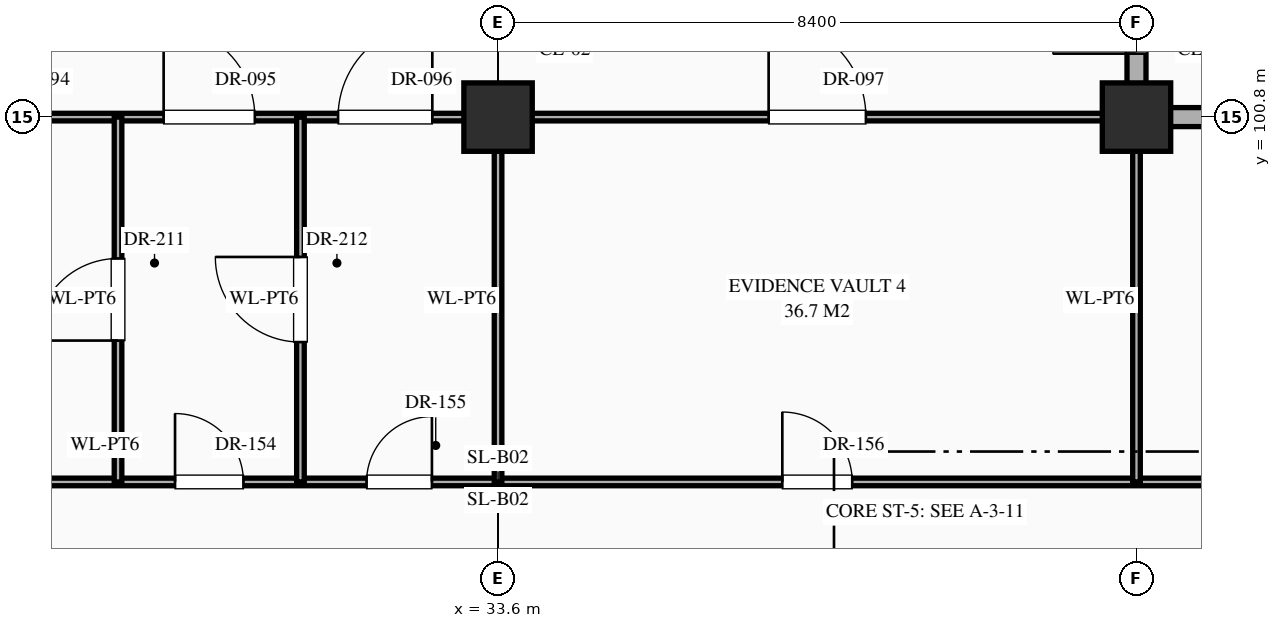
"""IFC4 building model, lengths in metres.
Left out: names, types, materials, properties, quantities, classifications, styles, units other than length and angle.
Written with IfcOpenShell. Run it as: python <this file> out.ifc"""

import sys

from ifc_helpers import new_model, si_unit, direction, frame, frame_2d, origin, origin_2d, place, context, subcontext, project, spatial, rectangle, extrude, element, fill, save


model = new_model("IFC4")
c1 = context("Model", 3, precision=1e-05, world=origin(), true_north=direction((0.0, 1.0)))
c2 = subcontext(c1, "Body", "Model", "MODEL_VIEW")
j1 = project(units=[si_unit("LENGTHUNIT", "METRE"), si_unit("PLANEANGLEUNIT", "RADIAN")], contexts=[c1])
p1 = place(None, origin())
s1 = spatial("IfcSite", under=j1, at=p1, CompositionType="ELEMENT")
p2 = place(p1, origin())
s2 = spatial("IfcBuilding", under=s1, at=p2, CompositionType="ELEMENT")
p3 = place(p2, frame((0.0, 0.0, -10.2)))
s3 = spatial("IfcBuildingStorey", under=s2, at=p3, CompositionType="ELEMENT", Elevation=-10.2)
for number, where, z_axis, x_axis in (
    (1, (33.6, 100.8, 0.0), (0.0, 0.0, 1.0), (1.0, 0.0, 0.0)),
    (2, (42.0, 100.8, 0.0), (0.0, 0.0, 1.0), (1.0, 0.0, 0.0)),
):
    element("IfcColumn", number, at=place(p3, frame(where, z_axis=z_axis, x_axis=x_axis)), inside=s3, PredefinedType="COLUMN", context=c2, shape_type="SweptSolid", body=[
        extrude(rectangle(XDim=0.9, YDim=0.9, at=origin_2d()), origin(), (0.0, 0.0, 1.0), 4.8),
    ])
p4 = place(p3, frame((0.04, 96.0, 0.0), z_axis=(0.0, 0.0, 1.0), x_axis=(1.0, 0.0, 0.0)))
e3 = element("IfcWall", 3, at=p4, inside=s3, PredefinedType="STANDARD", context=c2, shape_type="SweptSolid", body=[
    extrude(rectangle(XDim=151.16, YDim=0.1, at=frame_2d((75.58, 0.0))), origin(), (0.0, 0.0, 1.0), 4.48),
])
p5 = place(p4, frame((1.04, 0.0, 0.0)))
e4 = element("IfcOpeningElement", 4, at=p5, cuts=e3, PredefinedType="OPENING", context=c2, shape_type="SweptSolid", body=[
    extrude(rectangle(XDim=1.28, YDim=2.35, at=frame_2d((0.64, 1.175))), frame((0.0, 0.062, 0.0), z_axis=(0.0, -1.0, 0.0), x_axis=(1.0, 0.0, 0.0)), (0.0, 0.0, 1.0), 0.124),
])
p6 = place(p4, frame((4.09, 0.0, 0.0)))
e5 = element("IfcOpeningElement", 5, at=p6, cuts=e3, PredefinedType="OPENING", context=c2, shape_type="SweptSolid", body=[
    extrude(rectangle(XDim=0.94, YDim=2.3, at=frame_2d((0.47, 1.15))), frame((0.0, 0.062, 0.0), z_axis=(0.0, -1.0, 0.0), x_axis=(1.0, 0.0, 0.0)), (0.0, 0.0, 1.0), 0.124),
])
p7 = place(p4, frame((6.57, 0.0, 0.0)))
e6 = element("IfcOpeningElement", 6, at=p7, cuts=e3, PredefinedType="OPENING", context=c2, shape_type="SweptSolid", body=[
    extrude(rectangle(XDim=0.98, YDim=2.35, at=frame_2d((0.49, 1.175))), frame((0.0, 0.062, 0.0), z_axis=(0.0, -1.0, 0.0), x_axis=(1.0, 0.0, 0.0)), (0.0, 0.0, 1.0), 0.124),
])
p8 = place(p4, frame((12.05, 0.0, 0.0)))
e7 = element("IfcOpeningElement", 7, at=p8, cuts=e3, PredefinedType="OPENING", context=c2, shape_type="SweptSolid", body=[
    extrude(rectangle(XDim=1.02, YDim=2.4, at=frame_2d((0.51, 1.2))), frame((0.0, 0.062, 0.0), z_axis=(0.0, -1.0, 0.0), x_axis=(1.0, 0.0, 0.0)), (0.0, 0.0, 1.0), 0.124),
])
p9 = place(p4, frame((20.43, 0.0, 0.0)))
e8 = element("IfcOpeningElement", 8, at=p9, cuts=e3, PredefinedType="OPENING", context=c2, shape_type="SweptSolid", body=[
    extrude(rectangle(XDim=1.06, YDim=2.4, at=frame_2d((0.53, 1.2))), frame((0.0, 0.062, 0.0), z_axis=(0.0, -1.0, 0.0), x_axis=(1.0, 0.0, 0.0)), (0.0, 0.0, 1.0), 0.124),
])
p10 = place(p4, frame((26.29, 0.0, 0.0)))
e9 = element("IfcOpeningElement", 9, at=p10, cuts=e3, PredefinedType="OPENING", context=c2, shape_type="SweptSolid", body=[
    extrude(rectangle(XDim=1.14, YDim=2.4, at=frame_2d((0.57, 1.2))), frame((0.0, 0.062, 0.0), z_axis=(0.0, -1.0, 0.0), x_axis=(1.0, 0.0, 0.0)), (0.0, 0.0, 1.0), 0.124),
])
p11 = place(p4, frame((29.31, 0.0, 0.0)))
e10 = element("IfcOpeningElement", 10, at=p11, cuts=e3, PredefinedType="OPENING", context=c2, shape_type="SweptSolid", body=[
    extrude(rectangle(XDim=0.9, YDim=2.15, at=frame_2d((0.45, 1.075))), frame((0.0, 0.062, 0.0), z_axis=(0.0, -1.0, 0.0), x_axis=(1.0, 0.0, 0.0)), (0.0, 0.0, 1.0), 0.124),
])
p12 = place(p4, frame((31.83, 0.0, 0.0)))
e11 = element("IfcOpeningElement", 11, at=p12, cuts=e3, PredefinedType="OPENING", context=c2, shape_type="SweptSolid", body=[
    extrude(rectangle(XDim=0.86, YDim=2.1, at=frame_2d((0.43, 1.05))), frame((0.0, 0.062, 0.0), z_axis=(0.0, -1.0, 0.0), x_axis=(1.0, 0.0, 0.0)), (0.0, 0.0, 1.0), 0.124),
])
p13 = place(p4, frame((37.3, 0.0, 0.0)))
e12 = element("IfcOpeningElement", 12, at=p13, cuts=e3, PredefinedType="OPENING", context=c2, shape_type="SweptSolid", body=[
    extrude(rectangle(XDim=0.92, YDim=2.15, at=frame_2d((0.46, 1.075))), frame((0.0, 0.062, 0.0), z_axis=(0.0, -1.0, 0.0), x_axis=(1.0, 0.0, 0.0)), (0.0, 0.0, 1.0), 0.124),
])
p14 = place(p4, frame((45.68, 0.0, 0.0)))
e13 = element("IfcOpeningElement", 13, at=p14, cuts=e3, PredefinedType="OPENING", context=c2, shape_type="SweptSolid", body=[
    extrude(rectangle(XDim=0.96, YDim=2.2, at=frame_2d((0.48, 1.1))), frame((0.0, 0.062, 0.0), z_axis=(0.0, -1.0, 0.0), x_axis=(1.0, 0.0, 0.0)), (0.0, 0.0, 1.0), 0.124),
])
p15 = place(p4, frame((51.57, 0.0, 0.0)))
e14 = element("IfcOpeningElement", 14, at=p15, cuts=e3, PredefinedType="OPENING", context=c2, shape_type="SweptSolid", body=[
    extrude(rectangle(XDim=0.98, YDim=2.35, at=frame_2d((0.49, 1.175))), frame((0.0, 0.062, 0.0), z_axis=(0.0, -1.0, 0.0), x_axis=(1.0, 0.0, 0.0)), (0.0, 0.0, 1.0), 0.124),
])
p16 = place(p4, frame((54.45, 0.0, 0.0)))
e15 = element("IfcOpeningElement", 15, at=p16, cuts=e3, PredefinedType="OPENING", context=c2, shape_type="SweptSolid", body=[
    extrude(rectangle(XDim=1.02, YDim=2.4, at=frame_2d((0.51, 1.2))), frame((0.0, 0.062, 0.0), z_axis=(0.0, -1.0, 0.0), x_axis=(1.0, 0.0, 0.0)), (0.0, 0.0, 1.0), 0.124),
])
p17 = place(p4, frame((56.93, 0.0, 0.0)))
e16 = element("IfcOpeningElement", 16, at=p17, cuts=e3, PredefinedType="OPENING", context=c2, shape_type="SweptSolid", body=[
    extrude(rectangle(XDim=1.06, YDim=2.4, at=frame_2d((0.53, 1.2))), frame((0.0, 0.062, 0.0), z_axis=(0.0, -1.0, 0.0), x_axis=(1.0, 0.0, 0.0)), (0.0, 0.0, 1.0), 0.124),
])
p18 = place(p4, frame((62.39, 0.0, 0.0)))
e17 = element("IfcOpeningElement", 17, at=p18, cuts=e3, PredefinedType="OPENING", context=c2, shape_type="SweptSolid", body=[
    extrude(rectangle(XDim=1.14, YDim=2.4, at=frame_2d((0.57, 1.2))), frame((0.0, 0.062, 0.0), z_axis=(0.0, -1.0, 0.0), x_axis=(1.0, 0.0, 0.0)), (0.0, 0.0, 1.0), 0.124),
])
p19 = place(p4, frame((70.91, 0.0, 0.0)))
e18 = element("IfcOpeningElement", 18, at=p19, cuts=e3, PredefinedType="OPENING", context=c2, shape_type="SweptSolid", body=[
    extrude(rectangle(XDim=0.9, YDim=2.15, at=frame_2d((0.45, 1.075))), frame((0.0, 0.062, 0.0), z_axis=(0.0, -1.0, 0.0), x_axis=(1.0, 0.0, 0.0)), (0.0, 0.0, 1.0), 0.124),
])
p20 = place(p4, frame((79.33, 0.0, 0.0)))
e19 = element("IfcOpeningElement", 19, at=p20, cuts=e3, PredefinedType="OPENING", context=c2, shape_type="SweptSolid", body=[
    extrude(rectangle(XDim=0.86, YDim=2.1, at=frame_2d((0.43, 1.05))), frame((0.0, 0.062, 0.0), z_axis=(0.0, -1.0, 0.0), x_axis=(1.0, 0.0, 0.0)), (0.0, 0.0, 1.0), 0.124),
])
p21 = place(p4, frame((85.1, 0.0, 0.0)))
e20 = element("IfcOpeningElement", 20, at=p21, cuts=e3, PredefinedType="OPENING", context=c2, shape_type="SweptSolid", body=[
    extrude(rectangle(XDim=1.12, YDim=2.25, at=frame_2d((0.56, 1.125))), frame((0.0, 0.062, 0.0), z_axis=(0.0, -1.0, 0.0), x_axis=(1.0, 0.0, 0.0)), (0.0, 0.0, 1.0), 0.124),
])
p22 = place(p4, frame((87.98, 0.0, 0.0)))
e21 = element("IfcOpeningElement", 21, at=p22, cuts=e3, PredefinedType="OPENING", context=c2, shape_type="SweptSolid", body=[
    extrude(rectangle(XDim=1.16, YDim=2.3, at=frame_2d((0.58, 1.15))), frame((0.0, 0.062, 0.0), z_axis=(0.0, -1.0, 0.0), x_axis=(1.0, 0.0, 0.0)), (0.0, 0.0, 1.0), 0.124),
])
p23 = place(p4, frame((90.46, 0.0, 0.0)))
e22 = element("IfcOpeningElement", 22, at=p23, cuts=e3, PredefinedType="OPENING", context=c2, shape_type="SweptSolid", body=[
    extrude(rectangle(XDim=1.2, YDim=2.35, at=frame_2d((0.6, 1.175))), frame((0.0, 0.062, 0.0), z_axis=(0.0, -1.0, 0.0), x_axis=(1.0, 0.0, 0.0)), (0.0, 0.0, 1.0), 0.124),
])
p24 = place(p4, frame((95.94, 0.0, 0.0)))
e23 = element("IfcOpeningElement", 23, at=p24, cuts=e3, PredefinedType="OPENING", context=c2, shape_type="SweptSolid", body=[
    extrude(rectangle(XDim=1.24, YDim=2.3, at=frame_2d((0.62, 1.15))), frame((0.0, 0.062, 0.0), z_axis=(0.0, -1.0, 0.0), x_axis=(1.0, 0.0, 0.0)), (0.0, 0.0, 1.0), 0.124),
])
p25 = place(p4, frame((104.32, 0.0, 0.0)))
e24 = element("IfcOpeningElement", 24, at=p25, cuts=e3, PredefinedType="OPENING", context=c2, shape_type="SweptSolid", body=[
    extrude(rectangle(XDim=1.28, YDim=2.35, at=frame_2d((0.64, 1.175))), frame((0.0, 0.062, 0.0), z_axis=(0.0, -1.0, 0.0), x_axis=(1.0, 0.0, 0.0)), (0.0, 0.0, 1.0), 0.124),
])
p26 = place(p4, frame((110.39, 0.0, 0.0)))
e25 = element("IfcOpeningElement", 25, at=p26, cuts=e3, PredefinedType="OPENING", context=c2, shape_type="SweptSolid", body=[
    extrude(rectangle(XDim=0.94, YDim=2.3, at=frame_2d((0.47, 1.15))), frame((0.0, 0.062, 0.0), z_axis=(0.0, -1.0, 0.0), x_axis=(1.0, 0.0, 0.0)), (0.0, 0.0, 1.0), 0.124),
])
p27 = place(p4, frame((113.27, 0.0, 0.0)))
e26 = element("IfcOpeningElement", 26, at=p27, cuts=e3, PredefinedType="OPENING", context=c2, shape_type="SweptSolid", body=[
    extrude(rectangle(XDim=0.98, YDim=2.35, at=frame_2d((0.49, 1.175))), frame((0.0, 0.062, 0.0), z_axis=(0.0, -1.0, 0.0), x_axis=(1.0, 0.0, 0.0)), (0.0, 0.0, 1.0), 0.124),
])
p28 = place(p4, frame((115.75, 0.0, 0.0)))
e27 = element("IfcOpeningElement", 27, at=p28, cuts=e3, PredefinedType="OPENING", context=c2, shape_type="SweptSolid", body=[
    extrude(rectangle(XDim=1.02, YDim=2.4, at=frame_2d((0.51, 1.2))), frame((0.0, 0.062, 0.0), z_axis=(0.0, -1.0, 0.0), x_axis=(1.0, 0.0, 0.0)), (0.0, 0.0, 1.0), 0.124),
])
p29 = place(p4, frame((121.24, 0.0, 0.0)))
e28 = element("IfcOpeningElement", 28, at=p29, cuts=e3, PredefinedType="OPENING", context=c2, shape_type="SweptSolid", body=[
    extrude(rectangle(XDim=1.04, YDim=2.2, at=frame_2d((0.52, 1.1))), frame((0.0, 0.062, 0.0), z_axis=(0.0, -1.0, 0.0), x_axis=(1.0, 0.0, 0.0)), (0.0, 0.0, 1.0), 0.124),
])
p30 = place(p4, frame((129.62, 0.0, 0.0)))
e29 = element("IfcOpeningElement", 29, at=p30, cuts=e3, PredefinedType="OPENING", context=c2, shape_type="SweptSolid", body=[
    extrude(rectangle(XDim=1.08, YDim=2.25, at=frame_2d((0.54, 1.125))), frame((0.0, 0.062, 0.0), z_axis=(0.0, -1.0, 0.0), x_axis=(1.0, 0.0, 0.0)), (0.0, 0.0, 1.0), 0.124),
])
p31 = place(p4, frame((135.5, 0.0, 0.0)))
e30 = element("IfcOpeningElement", 30, at=p31, cuts=e3, PredefinedType="OPENING", context=c2, shape_type="SweptSolid", body=[
    extrude(rectangle(XDim=1.12, YDim=2.25, at=frame_2d((0.56, 1.125))), frame((0.0, 0.062, 0.0), z_axis=(0.0, -1.0, 0.0), x_axis=(1.0, 0.0, 0.0)), (0.0, 0.0, 1.0), 0.124),
])
p32 = place(p4, frame((138.38, 0.0, 0.0)))
e31 = element("IfcOpeningElement", 31, at=p32, cuts=e3, PredefinedType="OPENING", context=c2, shape_type="SweptSolid", body=[
    extrude(rectangle(XDim=1.16, YDim=2.3, at=frame_2d((0.58, 1.15))), frame((0.0, 0.062, 0.0), z_axis=(0.0, -1.0, 0.0), x_axis=(1.0, 0.0, 0.0)), (0.0, 0.0, 1.0), 0.124),
])
p33 = place(p4, frame((140.86, 0.0, 0.0)))
e32 = element("IfcOpeningElement", 32, at=p33, cuts=e3, PredefinedType="OPENING", context=c2, shape_type="SweptSolid", body=[
    extrude(rectangle(XDim=1.2, YDim=2.35, at=frame_2d((0.6, 1.175))), frame((0.0, 0.062, 0.0), z_axis=(0.0, -1.0, 0.0), x_axis=(1.0, 0.0, 0.0)), (0.0, 0.0, 1.0), 0.124),
])
p34 = place(p4, frame((146.34, 0.0, 0.0)))
e33 = element("IfcOpeningElement", 33, at=p34, cuts=e3, PredefinedType="OPENING", context=c2, shape_type="SweptSolid", body=[
    extrude(rectangle(XDim=1.24, YDim=2.3, at=frame_2d((0.62, 1.15))), frame((0.0, 0.062, 0.0), z_axis=(0.0, -1.0, 0.0), x_axis=(1.0, 0.0, 0.0)), (0.0, 0.0, 1.0), 0.124),
])
p35 = place(p3, frame((0.04, 100.8, 0.0), z_axis=(0.0, 0.0, 1.0), x_axis=(1.0, 0.0, 0.0)))
e34 = element("IfcWall", 34, at=p35, inside=s3, PredefinedType="STANDARD", context=c2, shape_type="SweptSolid", body=[
    extrude(rectangle(XDim=41.96, YDim=0.1, at=frame_2d((20.98, 0.0))), origin(), (0.0, 0.0, 1.0), 3.63),
])
p36 = place(p35, frame((1.353, 0.0, 0.0)))
e35 = element("IfcOpeningElement", 35, at=p36, cuts=e34, PredefinedType="OPENING", context=c2, shape_type="SweptSolid", body=[
    extrude(rectangle(XDim=0.96, YDim=2.2, at=frame_2d((0.48, 1.1))), frame((0.0, 0.062, 0.0), z_axis=(0.0, -1.0, 0.0), x_axis=(1.0, 0.0, 0.0)), (0.0, 0.0, 1.0), 0.124),
])
p37 = place(p35, frame((4.06, 0.0, 0.0)))
e36 = element("IfcOpeningElement", 36, at=p37, cuts=e34, PredefinedType="OPENING", context=c2, shape_type="SweptSolid", body=[
    extrude(rectangle(XDim=1.0, YDim=2.25, at=frame_2d((0.5, 1.125))), frame((0.0, 0.062, 0.0), z_axis=(0.0, -1.0, 0.0), x_axis=(1.0, 0.0, 0.0)), (0.0, 0.0, 1.0), 0.124),
])
p38 = place(p35, frame((6.367, 0.0, 0.0)))
e37 = element("IfcOpeningElement", 37, at=p38, cuts=e34, PredefinedType="OPENING", context=c2, shape_type="SweptSolid", body=[
    extrude(rectangle(XDim=1.04, YDim=2.2, at=frame_2d((0.52, 1.1))), frame((0.0, 0.062, 0.0), z_axis=(0.0, -1.0, 0.0), x_axis=(1.0, 0.0, 0.0)), (0.0, 0.0, 1.0), 0.124),
])
p39 = place(p35, frame((12.02, 0.0, 0.0)))
e38 = element("IfcOpeningElement", 38, at=p39, cuts=e34, PredefinedType="OPENING", context=c2, shape_type="SweptSolid", body=[
    extrude(rectangle(XDim=1.08, YDim=2.25, at=frame_2d((0.54, 1.125))), frame((0.0, 0.062, 0.0), z_axis=(0.0, -1.0, 0.0), x_axis=(1.0, 0.0, 0.0)), (0.0, 0.0, 1.0), 0.124),
])
p40 = place(p35, frame((20.387, 0.0, 0.0)))
e39 = element("IfcOpeningElement", 39, at=p40, cuts=e34, PredefinedType="OPENING", context=c2, shape_type="SweptSolid", body=[
    extrude(rectangle(XDim=1.12, YDim=2.25, at=frame_2d((0.56, 1.125))), frame((0.0, 0.062, 0.0), z_axis=(0.0, -1.0, 0.0), x_axis=(1.0, 0.0, 0.0)), (0.0, 0.0, 1.0), 0.124),
])
p41 = place(p35, frame((26.465, 0.0, 0.0)))
e40 = element("IfcOpeningElement", 40, at=p41, cuts=e34, PredefinedType="OPENING", context=c2, shape_type="SweptSolid", body=[
    extrude(rectangle(XDim=1.16, YDim=2.3, at=frame_2d((0.58, 1.15))), frame((0.0, 0.062, 0.0), z_axis=(0.0, -1.0, 0.0), x_axis=(1.0, 0.0, 0.0)), (0.0, 0.0, 1.0), 0.124),
])
p42 = place(p35, frame((29.16, 0.0, 0.0)))
e41 = element("IfcOpeningElement", 41, at=p42, cuts=e34, PredefinedType="OPENING", context=c2, shape_type="SweptSolid", body=[
    extrude(rectangle(XDim=1.2, YDim=2.35, at=frame_2d((0.6, 1.175))), frame((0.0, 0.062, 0.0), z_axis=(0.0, -1.0, 0.0), x_axis=(1.0, 0.0, 0.0)), (0.0, 0.0, 1.0), 0.124),
])
p43 = place(p35, frame((31.455, 0.0, 0.0)))
e42 = element("IfcOpeningElement", 42, at=p43, cuts=e34, PredefinedType="OPENING", context=c2, shape_type="SweptSolid", body=[
    extrude(rectangle(XDim=1.24, YDim=2.3, at=frame_2d((0.62, 1.15))), frame((0.0, 0.062, 0.0), z_axis=(0.0, -1.0, 0.0), x_axis=(1.0, 0.0, 0.0)), (0.0, 0.0, 1.0), 0.124),
])
p44 = place(p35, frame((37.12, 0.0, 0.0)))
e43 = element("IfcOpeningElement", 43, at=p44, cuts=e34, PredefinedType="OPENING", context=c2, shape_type="SweptSolid", body=[
    extrude(rectangle(XDim=1.28, YDim=2.35, at=frame_2d((0.64, 1.175))), frame((0.0, 0.062, 0.0), z_axis=(0.0, -1.0, 0.0), x_axis=(1.0, 0.0, 0.0)), (0.0, 0.0, 1.0), 0.124),
])
p45 = place(p3, frame((42.0, 100.8, 0.0), z_axis=(0.0, 0.0, 1.0), x_axis=(1.0, 0.0, 0.0)))
e44 = element("IfcWall", 44, at=p45, inside=s3, PredefinedType="STANDARD", context=c2, shape_type="SweptSolid", body=[
    extrude(rectangle(XDim=4.2, YDim=0.25, at=frame_2d((2.1, 0.0))), origin(), (0.0, 0.0, 1.0), 3.63),
])
p46 = place(p3, frame((28.6, 96.0, 0.0), z_axis=(0.0, 0.0, 1.0), x_axis=(0.0, 1.0, 0.0)))
e45 = element("IfcWall", 45, at=p46, inside=s3, PredefinedType="STANDARD", context=c2, shape_type="SweptSolid", body=[
    extrude(rectangle(XDim=4.8, YDim=0.1, at=frame_2d((2.4, 0.0))), origin(), (0.0, 0.0, 1.0), 4.48),
])
p47 = place(p46, frame((1.86, 0.0, 0.0)))
e46 = element("IfcOpeningElement", 46, at=p47, cuts=e45, PredefinedType="OPENING", context=c2, shape_type="SweptSolid", body=[
    extrude(rectangle(XDim=1.08, YDim=2.25, at=frame_2d((0.54, 1.125))), frame((0.0, 0.062, 0.0), z_axis=(0.0, -1.0, 0.0), x_axis=(1.0, 0.0, 0.0)), (0.0, 0.0, 1.0), 0.124),
])
p48 = place(p3, frame((31.0, 96.0, 0.0), z_axis=(0.0, 0.0, 1.0), x_axis=(0.0, 1.0, 0.0)))
e47 = element("IfcWall", 47, at=p48, inside=s3, PredefinedType="STANDARD", context=c2, shape_type="SweptSolid", body=[
    extrude(rectangle(XDim=4.8, YDim=0.1, at=frame_2d((2.4, 0.0))), origin(), (0.0, 0.0, 1.0), 4.48),
])
p49 = place(p48, frame((1.84, 0.0, 0.0)))
e48 = element("IfcOpeningElement", 48, at=p49, cuts=e47, PredefinedType="OPENING", context=c2, shape_type="SweptSolid", body=[
    extrude(rectangle(XDim=1.12, YDim=2.25, at=frame_2d((0.56, 1.125))), frame((0.0, 0.062, 0.0), z_axis=(0.0, -1.0, 0.0), x_axis=(1.0, 0.0, 0.0)), (0.0, 0.0, 1.0), 0.124),
])
for number, where, z_axis, x_axis in (
    (49, (33.6, 96.0, 0.0), (0.0, 0.0, 1.0), (0.0, 1.0, 0.0)),
    (50, (42.0, 96.0, 0.0), (0.0, 0.0, 1.0), (0.0, 1.0, 0.0)),
):
    element("IfcWall", number, at=place(p3, frame(where, z_axis=z_axis, x_axis=x_axis)), inside=s3, PredefinedType="STANDARD", context=c2, shape_type="SweptSolid", body=[
        extrude(rectangle(XDim=4.8, YDim=0.1, at=frame_2d((2.4, 0.0))), origin(), (0.0, 0.0, 1.0), 3.73),
    ])
p50 = place(p3, frame((42.0, 100.8, 0.0), z_axis=(0.0, 0.0, 1.0), x_axis=(0.0, 1.0, 0.0)))
e51 = element("IfcWall", 51, at=p50, inside=s3, PredefinedType="STANDARD", context=c2, shape_type="SweptSolid", body=[
    extrude(rectangle(XDim=3.6, YDim=0.25, at=frame_2d((1.8, 0.0))), origin(), (0.0, 0.0, 1.0), 3.73),
])
p51 = place(p50, frame((0.835, 0.0, 0.0)))
e52 = element("IfcOpeningElement", 52, at=p51, cuts=e51, PredefinedType="OPENING", context=c2, shape_type="SweptSolid", body=[
    extrude(rectangle(XDim=1.1, YDim=2.2, at=frame_2d((0.55, 1.1))), frame((0.0, 0.137, 0.0), z_axis=(0.0, -1.0, 0.0), x_axis=(1.0, 0.0, 0.0)), (0.0, 0.0, 1.0), 0.274),
])
p52 = place(p51, origin())
e53 = element("IfcDoor", 53, at=p52, inside=s3, OperationType="SINGLE_SWING_LEFT", PredefinedType="DOOR", context=c2, shape_type="SweptSolid", body=[
    extrude(rectangle(XDim=1.1, YDim=2.2, at=frame_2d((0.55, 1.1))), frame((0.0, 0.025, 0.0), z_axis=(0.0, -1.0, 0.0), x_axis=(1.0, 0.0, 0.0)), (0.0, 0.0, 1.0), 0.05),
])
fill(e52, e53)
p53 = place(p42, origin())
e54 = element("IfcDoor", 54, at=p53, inside=s3, OperationType="SINGLE_SWING_LEFT", PredefinedType="DOOR", context=c2, shape_type="SweptSolid", body=[
    extrude(rectangle(XDim=1.2, YDim=2.35, at=frame_2d((0.6, 1.175))), frame((0.0, 0.025, 0.0), z_axis=(0.0, -1.0, 0.0), x_axis=(1.0, 0.0, 0.0)), (0.0, 0.0, 1.0), 0.05),
])
fill(e41, e54)
p54 = place(p43, origin())
e55 = element("IfcDoor", 55, at=p54, inside=s3, OperationType="SINGLE_SWING_RIGHT", PredefinedType="DOOR", context=c2, shape_type="SweptSolid", body=[
    extrude(rectangle(XDim=1.24, YDim=2.3, at=frame_2d((0.62, 1.15))), frame((0.0, 0.025, 0.0), z_axis=(0.0, -1.0, 0.0), x_axis=(1.0, 0.0, 0.0)), (0.0, 0.0, 1.0), 0.05),
])
fill(e42, e55)
p55 = place(p44, origin())
e56 = element("IfcDoor", 56, at=p55, inside=s3, OperationType="SINGLE_SWING_LEFT", PredefinedType="DOOR", context=c2, shape_type="SweptSolid", body=[
    extrude(rectangle(XDim=1.28, YDim=2.35, at=frame_2d((0.64, 1.175))), frame((0.0, 0.025, 0.0), z_axis=(0.0, -1.0, 0.0), x_axis=(1.0, 0.0, 0.0)), (0.0, 0.0, 1.0), 0.05),
])
fill(e43, e56)
p56 = place(p11, origin())
e57 = element("IfcDoor", 57, at=p56, inside=s3, OperationType="SINGLE_SWING_LEFT", PredefinedType="DOOR", context=c2, shape_type="SweptSolid", body=[
    extrude(rectangle(XDim=0.9, YDim=2.15, at=frame_2d((0.45, 1.075))), frame((0.0, 0.025, 0.0), z_axis=(0.0, -1.0, 0.0), x_axis=(1.0, 0.0, 0.0)), (0.0, 0.0, 1.0), 0.05),
])
fill(e10, e57)
p57 = place(p12, origin())
e58 = element("IfcDoor", 58, at=p57, inside=s3, OperationType="SINGLE_SWING_RIGHT", PredefinedType="DOOR", context=c2, shape_type="SweptSolid", body=[
    extrude(rectangle(XDim=0.86, YDim=2.1, at=frame_2d((0.43, 1.05))), frame((0.0, 0.025, 0.0), z_axis=(0.0, -1.0, 0.0), x_axis=(1.0, 0.0, 0.0)), (0.0, 0.0, 1.0), 0.05),
])
fill(e11, e58)
p58 = place(p13, origin())
e59 = element("IfcDoor", 59, at=p58, inside=s3, OperationType="SINGLE_SWING_LEFT", PredefinedType="DOOR", context=c2, shape_type="SweptSolid", body=[
    extrude(rectangle(XDim=0.92, YDim=2.15, at=frame_2d((0.46, 1.075))), frame((0.0, 0.025, 0.0), z_axis=(0.0, -1.0, 0.0), x_axis=(1.0, 0.0, 0.0)), (0.0, 0.0, 1.0), 0.05),
])
fill(e12, e59)
p59 = place(p47, origin())
e60 = element("IfcDoor", 60, at=p59, inside=s3, OperationType="SINGLE_SWING_LEFT", PredefinedType="DOOR", context=c2, shape_type="SweptSolid", body=[
    extrude(rectangle(XDim=1.08, YDim=2.25, at=frame_2d((0.54, 1.125))), frame((0.0, 0.025, 0.0), z_axis=(0.0, -1.0, 0.0), x_axis=(1.0, 0.0, 0.0)), (0.0, 0.0, 1.0), 0.05),
])
fill(e46, e60)
p60 = place(p49, origin())
e61 = element("IfcDoor", 61, at=p60, inside=s3, OperationType="SINGLE_SWING_RIGHT", PredefinedType="DOOR", context=c2, shape_type="SweptSolid", body=[
    extrude(rectangle(XDim=1.12, YDim=2.25, at=frame_2d((0.56, 1.125))), frame((0.0, 0.025, 0.0), z_axis=(0.0, -1.0, 0.0), x_axis=(1.0, 0.0, 0.0)), (0.0, 0.0, 1.0), 0.05),
])
fill(e48, e61)
save(model, sys.argv[1])
